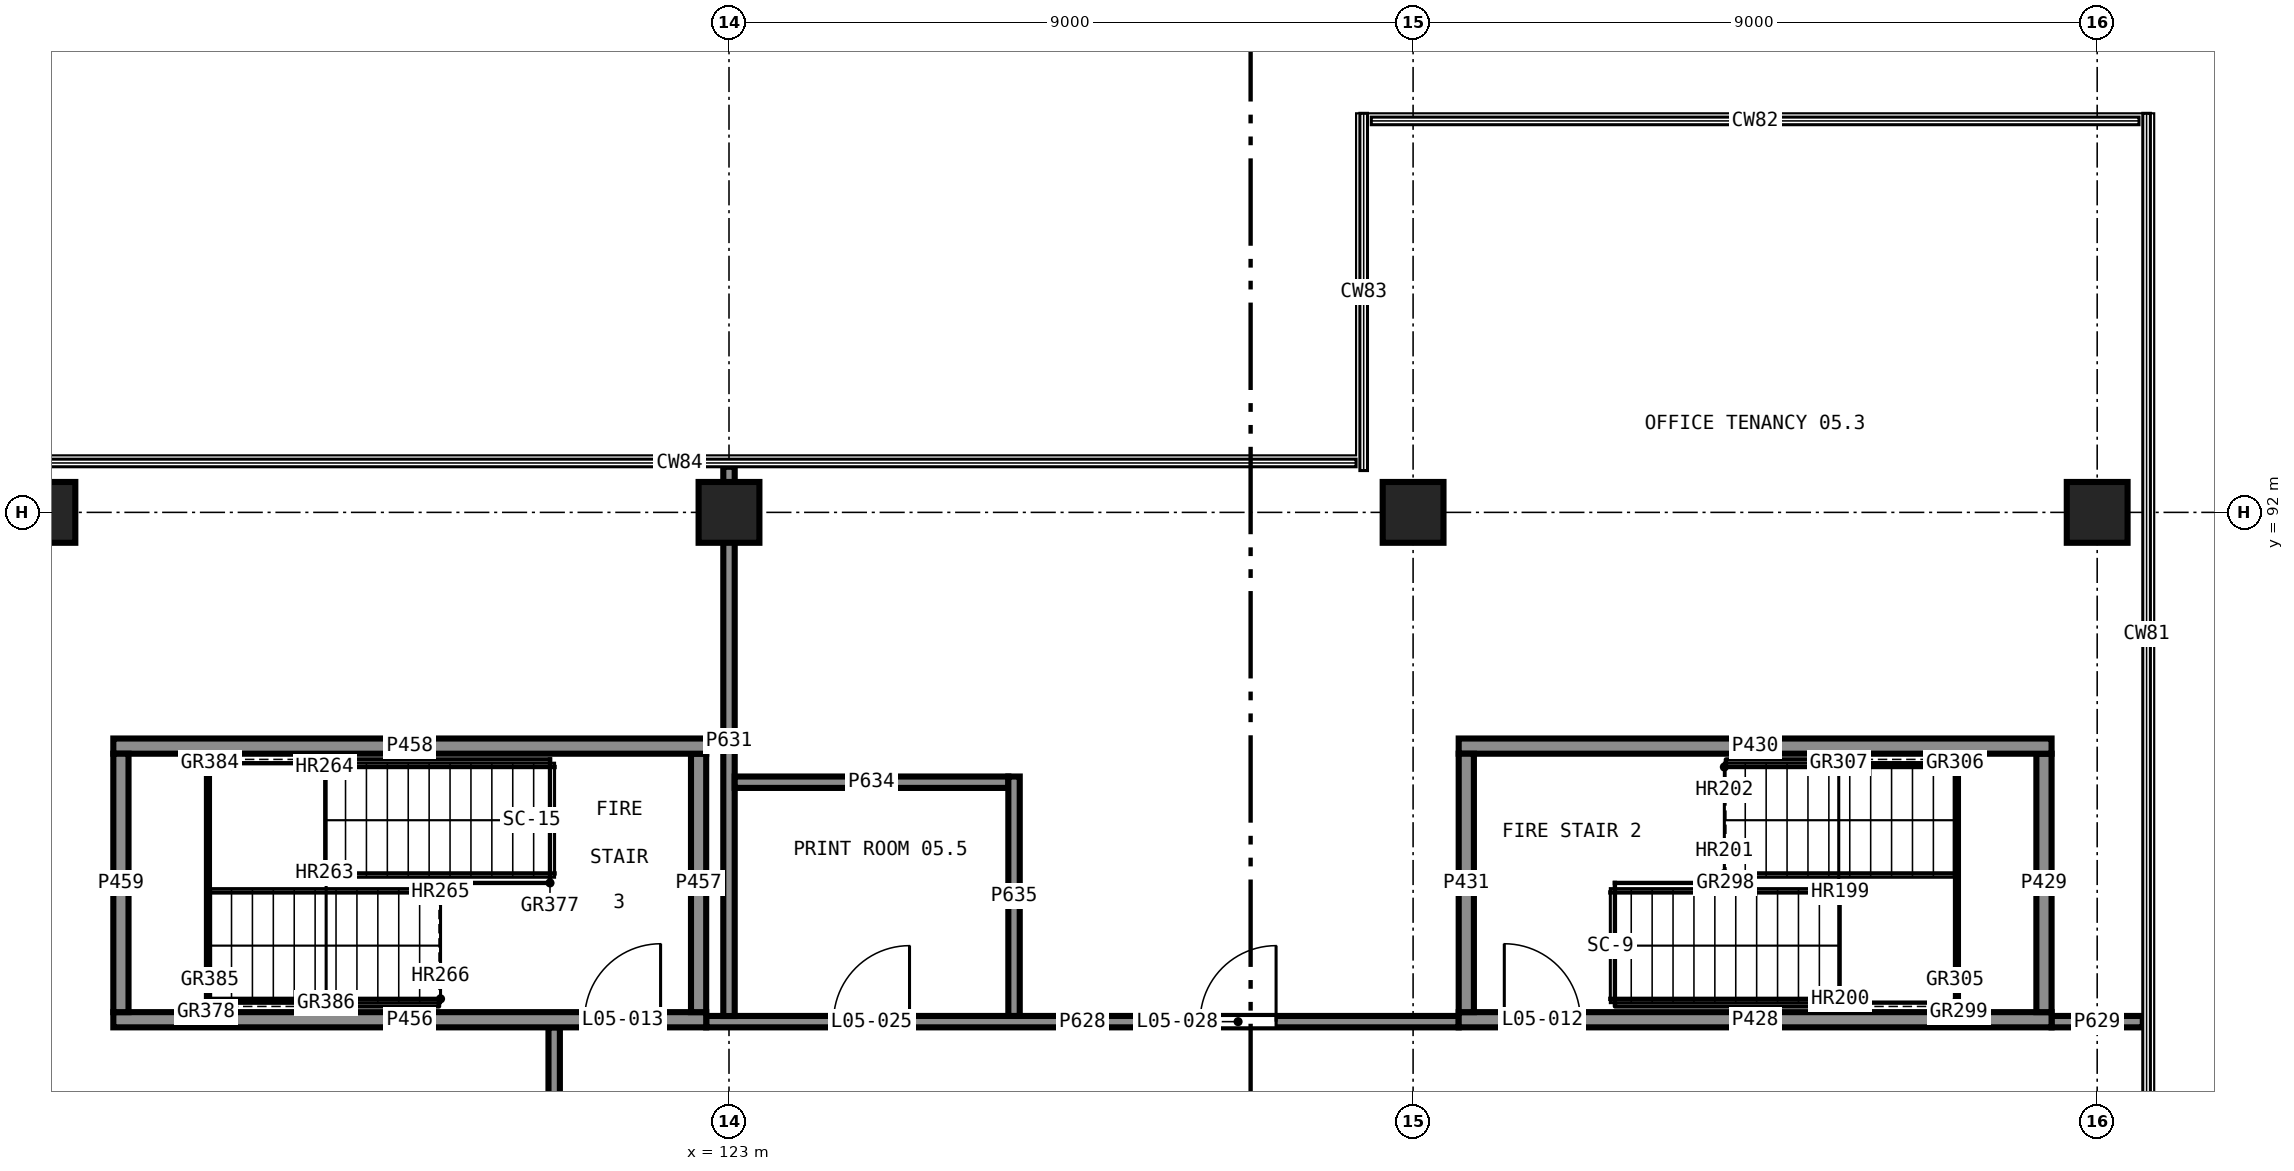
"""IFC4 building model, lengths in metres.
Left out: names, types, materials, properties, quantities, classifications, styles, units other than length and angle.
Written with IfcOpenShell. Run it as: python <this file> out.ifc"""

import sys

from ifc_helpers import new_model, si_unit, direction, frame, frame_2d, origin, origin_2d, place, context, subcontext, project, spatial, rectangle, extrude, element, fill, save


model = new_model("IFC4")
c1 = context("Model", 3, precision=1e-05, world=origin(), true_north=direction((0.0, 1.0)))
c2 = subcontext(c1, "Body", "Model", "MODEL_VIEW")
j1 = project(units=[si_unit("LENGTHUNIT", "METRE"), si_unit("PLANEANGLEUNIT", "RADIAN")], contexts=[c1])
p1 = place(None, origin())
s1 = spatial("IfcSite", under=j1, at=p1, CompositionType="ELEMENT")
p2 = place(p1, origin())
s2 = spatial("IfcBuilding", under=s1, at=p2, CompositionType="ELEMENT")
p3 = place(p2, frame((0.0, 0.0, 21.5)))
s3 = spatial("IfcBuildingStorey", under=s2, at=p3, CompositionType="ELEMENT", Elevation=21.5)
for number, where, z_axis, x_axis in (
    (1, (114.0, 92.0, 0.0), (0.0, 0.0, 1.0), (1.0, 0.0, 0.0)),
    (2, (123.0, 92.0, 0.0), (0.0, 0.0, 1.0), (1.0, 0.0, 0.0)),
    (3, (132.0, 92.0, 0.0), (0.0, 0.0, 1.0), (1.0, 0.0, 0.0)),
    (4, (141.0, 92.0, 0.0), (0.0, 0.0, 1.0), (1.0, 0.0, 0.0)),
):
    element("IfcColumn", number, at=place(p3, frame(where, z_axis=z_axis, x_axis=x_axis)), inside=s3, PredefinedType="COLUMN", context=c2, shape_type="SweptSolid", body=[
        extrude(rectangle(XDim=0.8, YDim=0.8, at=origin_2d()), origin(), (0.0, 0.0, 1.0), 4.0),
    ])
p4 = place(p3, frame((132.6, 85.325, 0.0), z_axis=(0.0, 0.0, 1.0), x_axis=(1.0, 0.0, 0.0)))
e5 = element("IfcWall", 5, at=p4, inside=s3, PredefinedType="SHEAR", context=c2, shape_type="SweptSolid", body=[
    extrude(rectangle(XDim=7.8, YDim=0.2, at=frame_2d((3.9, 0.0))), origin(), (0.0, 0.0, 1.0), 3.75),
])
p5 = place(p4, frame((0.6, 0.0, 0.0)))
e6 = element("IfcOpeningElement", 6, at=p5, cuts=e5, PredefinedType="OPENING", context=c2, shape_type="SweptSolid", body=[
    extrude(rectangle(XDim=1.0, YDim=2.1, at=frame_2d((0.5, 1.05))), frame((0.0, 0.11, 0.0), z_axis=(0.0, -1.0, 0.0), x_axis=(1.0, 0.0, 0.0)), (0.0, 0.0, 1.0), 0.22),
])
p6 = place(p3, frame((140.3, 85.425, 0.0), z_axis=(0.0, 0.0, 1.0), x_axis=(0.0, 1.0, 0.0)))
e7 = element("IfcWall", 7, at=p6, inside=s3, PredefinedType="SHEAR", context=c2, shape_type="SweptSolid", body=[
    extrude(rectangle(XDim=3.4, YDim=0.2, at=frame_2d((1.7, 0.0))), origin(), (0.0, 0.0, 1.0), 3.75),
])
p7 = place(p3, frame((140.4, 88.925, 0.0), z_axis=(0.0, 0.0, 1.0), x_axis=(-1.0, 0.0, 0.0)))
e8 = element("IfcWall", 8, at=p7, inside=s3, PredefinedType="SHEAR", context=c2, shape_type="SweptSolid", body=[
    extrude(rectangle(XDim=7.8, YDim=0.2, at=frame_2d((3.9, 0.0))), origin(), (0.0, 0.0, 1.0), 3.75),
])
p8 = place(p3, frame((132.7, 88.825, 0.0), z_axis=(0.0, 0.0, 1.0), x_axis=(0.0, -1.0, 0.0)))
e9 = element("IfcWall", 9, at=p8, inside=s3, PredefinedType="SHEAR", context=c2, shape_type="SweptSolid", body=[
    extrude(rectangle(XDim=3.4, YDim=0.2, at=frame_2d((1.7, 0.0))), origin(), (0.0, 0.0, 1.0), 3.75),
])
p9 = place(p3, frame((114.9, 85.325, 0.0), z_axis=(0.0, 0.0, 1.0), x_axis=(1.0, 0.0, 0.0)))
e10 = element("IfcWall", 10, at=p9, inside=s3, PredefinedType="SHEAR", context=c2, shape_type="SweptSolid", body=[
    extrude(rectangle(XDim=7.8, YDim=0.2, at=frame_2d((3.9, 0.0))), origin(), (0.0, 0.0, 1.0), 3.75),
])
p10 = place(p9, frame((6.2, 0.0, 0.0)))
e11 = element("IfcOpeningElement", 11, at=p10, cuts=e10, PredefinedType="OPENING", context=c2, shape_type="SweptSolid", body=[
    extrude(rectangle(XDim=1.0, YDim=2.1, at=frame_2d((0.5, 1.05))), frame((0.0, 0.11, 0.0), z_axis=(0.0, -1.0, 0.0), x_axis=(1.0, 0.0, 0.0)), (0.0, 0.0, 1.0), 0.22),
])
p11 = place(p3, frame((122.6, 85.425, 0.0), z_axis=(0.0, 0.0, 1.0), x_axis=(0.0, 1.0, 0.0)))
e12 = element("IfcWall", 12, at=p11, inside=s3, PredefinedType="SHEAR", context=c2, shape_type="SweptSolid", body=[
    extrude(rectangle(XDim=3.4, YDim=0.2, at=frame_2d((1.7, 0.0))), origin(), (0.0, 0.0, 1.0), 3.75),
])
p12 = place(p3, frame((122.7, 88.925, 0.0), z_axis=(0.0, 0.0, 1.0), x_axis=(-1.0, 0.0, 0.0)))
e13 = element("IfcWall", 13, at=p12, inside=s3, PredefinedType="SHEAR", context=c2, shape_type="SweptSolid", body=[
    extrude(rectangle(XDim=7.8, YDim=0.2, at=frame_2d((3.9, 0.0))), origin(), (0.0, 0.0, 1.0), 3.75),
])
p13 = place(p3, frame((115.0, 88.825, 0.0), z_axis=(0.0, 0.0, 1.0), x_axis=(0.0, -1.0, 0.0)))
e14 = element("IfcWall", 14, at=p13, inside=s3, PredefinedType="SHEAR", context=c2, shape_type="SweptSolid", body=[
    extrude(rectangle(XDim=3.4, YDim=0.2, at=frame_2d((1.7, 0.0))), origin(), (0.0, 0.0, 1.0), 3.75),
])
p14 = place(p3, frame((120.7, 62.7, 0.0), z_axis=(0.0, 0.0, 1.0), x_axis=(0.0, 1.0, 0.0)))
e15 = element("IfcWall", 15, at=p14, inside=s3, PredefinedType="PARTITIONING", context=c2, shape_type="SweptSolid", body=[
    extrude(rectangle(XDim=22.525, YDim=0.15, at=frame_2d((11.263, 0.0))), origin(), (0.0, 0.0, 1.0), 3.75),
])
p15 = place(p14, frame((10.748, 0.0, 0.0)))
e16 = element("IfcOpeningElement", 16, at=p15, cuts=e15, PredefinedType="OPENING", context=c2, shape_type="SweptSolid", body=[
    extrude(rectangle(XDim=1.0, YDim=2.1, at=frame_2d((0.5, 1.05))), frame((0.0, 0.085, 0.0), z_axis=(0.0, -1.0, 0.0), x_axis=(1.0, 0.0, 0.0)), (0.0, 0.0, 1.0), 0.17),
])
p16 = place(p3, frame((122.7, 85.3, 0.0), z_axis=(0.0, 0.0, 1.0), x_axis=(1.0, 0.0, 0.0)))
e17 = element("IfcWall", 17, at=p16, inside=s3, PredefinedType="PARTITIONING", context=c2, shape_type="SweptSolid", body=[
    extrude(rectangle(XDim=9.9, YDim=0.15, at=frame_2d((4.95, 0.0))), origin(), (0.0, 0.0, 1.0), 3.75),
])
p17 = place(p16, frame((1.675, 0.0, 0.0)))
e18 = element("IfcOpeningElement", 18, at=p17, cuts=e17, PredefinedType="OPENING", context=c2, shape_type="SweptSolid", body=[
    extrude(rectangle(XDim=1.0, YDim=2.1, at=frame_2d((0.5, 1.05))), frame((0.0, 0.085, 0.0), z_axis=(0.0, -1.0, 0.0), x_axis=(1.0, 0.0, 0.0)), (0.0, 0.0, 1.0), 0.17),
])
p18 = place(p16, frame((6.498, 0.0, 0.0)))
e19 = element("IfcOpeningElement", 19, at=p18, cuts=e17, PredefinedType="OPENING", context=c2, shape_type="SweptSolid", body=[
    extrude(rectangle(XDim=1.0, YDim=2.1, at=frame_2d((0.5, 1.05))), frame((0.0, 0.085, 0.0), z_axis=(0.0, -1.0, 0.0), x_axis=(1.0, 0.0, 0.0)), (0.0, 0.0, 1.0), 0.17),
])
p19 = place(p3, frame((140.4, 85.3, 0.0), z_axis=(0.0, 0.0, 1.0), x_axis=(1.0, 0.0, 0.0)))
e20 = element("IfcWall", 20, at=p19, inside=s3, PredefinedType="PARTITIONING", context=c2, shape_type="SweptSolid", body=[
    extrude(rectangle(XDim=1.2, YDim=0.15, at=frame_2d((0.6, 0.0))), origin(), (0.0, 0.0, 1.0), 3.75),
])
p20 = place(p3, frame((123.0, 85.374, 0.0), z_axis=(0.0, 0.0, 1.0), x_axis=(0.0, 1.0, 0.0)))
e21 = element("IfcWall", 21, at=p20, inside=s3, PredefinedType="PARTITIONING", context=c2, shape_type="SweptSolid", body=[
    extrude(rectangle(XDim=7.226, YDim=0.15, at=frame_2d((3.613, 0.0))), origin(), (0.0, 0.0, 1.0), 2.85),
])
p21 = place(p3, frame((123.075, 88.45, 0.0), z_axis=(0.0, 0.0, 1.0), x_axis=(1.0, 0.0, 0.0)))
e22 = element("IfcWall", 22, at=p21, inside=s3, PredefinedType="PARTITIONING", context=c2, shape_type="SweptSolid", body=[
    extrude(rectangle(XDim=3.6, YDim=0.15, at=frame_2d((1.8, 0.0))), origin(), (0.0, 0.0, 1.0), 3.75),
])
p22 = place(p3, frame((126.75, 85.375, 0.0), z_axis=(0.0, 0.0, 1.0), x_axis=(0.0, 1.0, 0.0)))
e23 = element("IfcWall", 23, at=p22, inside=s3, PredefinedType="PARTITIONING", context=c2, shape_type="SweptSolid", body=[
    extrude(rectangle(XDim=3.15, YDim=0.15, at=frame_2d((1.575, 0.0))), origin(), (0.0, 0.0, 1.0), 3.75),
])
p23 = place(p5, origin())
e24 = element("IfcDoor", 24, at=p23, inside=s3, OperationType="SINGLE_SWING_RIGHT", PredefinedType="DOOR", context=c2, shape_type="SweptSolid", body=[
    extrude(rectangle(XDim=1.0, YDim=2.1, at=frame_2d((0.5, 1.05))), frame((0.0, 0.025, 0.0), z_axis=(0.0, -1.0, 0.0), x_axis=(1.0, 0.0, 0.0)), (0.0, 0.0, 1.0), 0.05),
])
fill(e6, e24)
p24 = place(p10, origin())
e25 = element("IfcDoor", 25, at=p24, inside=s3, OperationType="SINGLE_SWING_LEFT", PredefinedType="DOOR", context=c2, shape_type="SweptSolid", body=[
    extrude(rectangle(XDim=1.0, YDim=2.1, at=frame_2d((0.5, 1.05))), frame((0.0, 0.025, 0.0), z_axis=(0.0, -1.0, 0.0), x_axis=(1.0, 0.0, 0.0)), (0.0, 0.0, 1.0), 0.05),
])
fill(e11, e25)
p25 = place(p17, origin())
e26 = element("IfcDoor", 26, at=p25, inside=s3, OperationType="SINGLE_SWING_LEFT", PredefinedType="DOOR", context=c2, shape_type="SweptSolid", body=[
    extrude(rectangle(XDim=1.0, YDim=2.1, at=frame_2d((0.5, 1.05))), frame((0.0, 0.025, 0.0), z_axis=(0.0, -1.0, 0.0), x_axis=(1.0, 0.0, 0.0)), (0.0, 0.0, 1.0), 0.05),
])
fill(e18, e26)
p26 = place(p18, origin())
e27 = element("IfcDoor", 27, at=p26, inside=s3, OperationType="SINGLE_SWING_LEFT", PredefinedType="DOOR", context=c2, shape_type="SweptSolid", body=[
    extrude(rectangle(XDim=1.0, YDim=2.1, at=frame_2d((0.5, 1.05))), frame((0.0, 0.025, 0.0), z_axis=(0.0, -1.0, 0.0), x_axis=(1.0, 0.0, 0.0)), (0.0, 0.0, 1.0), 0.05),
])
fill(e19, e27)
save(model, sys.argv[1])
